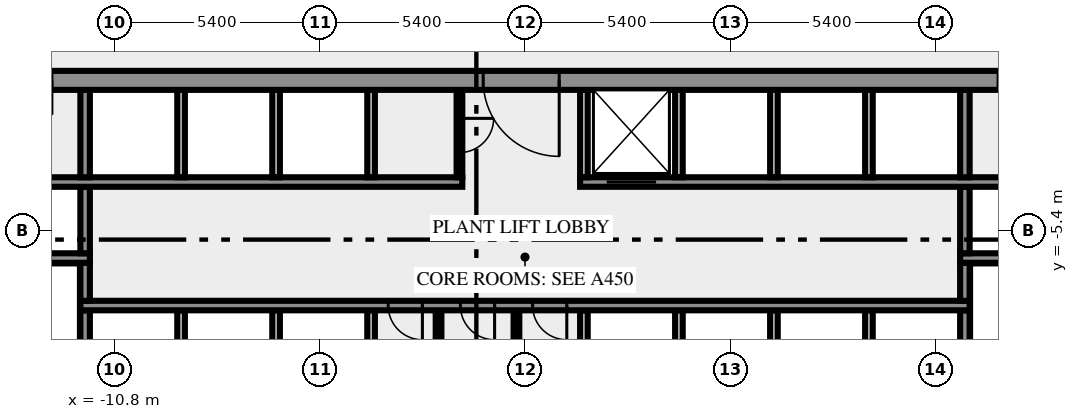
"""IFC4 building model, lengths in metres.
Left out: names, types, materials, properties, quantities, classifications, styles, units other than length and angle.
Written with IfcOpenShell. Run it as: python <this file> out.ifc"""

import sys

from ifc_helpers import new_model, si_unit, direction, frame, frame_2d, origin, place, context, subcontext, project, spatial, rectangle, extrude, element, fill, save


model = new_model("IFC4")
c1 = context("Model", 3, precision=1e-05, world=origin(), true_north=direction((0.0, 1.0)))
c2 = subcontext(c1, "Body", "Model", "MODEL_VIEW")
j1 = project(units=[si_unit("LENGTHUNIT", "METRE"), si_unit("PLANEANGLEUNIT", "RADIAN")], contexts=[c1])
p1 = place(None, origin())
s1 = spatial("IfcSite", under=j1, at=p1, CompositionType="ELEMENT")
p2 = place(p1, origin())
s2 = spatial("IfcBuilding", under=s1, at=p2, CompositionType="ELEMENT")
p3 = place(p2, frame((0.0, 0.0, 25.0)))
s3 = spatial("IfcBuildingStorey", under=s2, at=p3, CompositionType="ELEMENT", Elevation=25.0)
p4 = place(p3, frame((-11.575, -10.5, 0.0), z_axis=(0.0, 0.0, 1.0), x_axis=(0.0, 1.0, 0.0)))
e1 = element("IfcWall", 1, at=p4, inside=s3, PredefinedType="SHEAR", context=c2, shape_type="SweptSolid", body=[
    extrude(rectangle(XDim=3.0, YDim=0.25, at=frame_2d((1.5, 0.0))), origin(), (0.0, 0.0, 1.0), 5.65),
])
for number, where, z_axis, x_axis in (
    (2, (-9.05, -10.5, 0.0), (0.0, 0.0, 1.0), (0.0, 1.0, 0.0)),
    (3, (-6.55, -10.5, 0.0), (0.0, 0.0, 1.0), (0.0, 1.0, 0.0)),
    (4, (-4.05, -10.5, 0.0), (0.0, 0.0, 1.0), (0.0, 1.0, 0.0)),
):
    element("IfcWall", number, at=place(p3, frame(where, z_axis=z_axis, x_axis=x_axis)), inside=s3, PredefinedType="SOLIDWALL", context=c2, shape_type="SweptSolid", body=[
        extrude(rectangle(XDim=3.0, YDim=0.2, at=frame_2d((1.5, 0.0))), origin(), (0.0, 0.0, 1.0), 5.65),
    ])
for number, where, z_axis, x_axis in (
    (5, (-2.275, -10.5, 0.0), (0.0, 0.0, 1.0), (0.0, 1.0, 0.0)),
    (6, (-0.225, -10.5, 0.0), (0.0, 0.0, 1.0), (0.0, 1.0, 0.0)),
):
    element("IfcWall", number, at=place(p3, frame(where, z_axis=z_axis, x_axis=x_axis)), inside=s3, PredefinedType="PARTITIONING", context=c2, shape_type="SweptSolid", body=[
        extrude(rectangle(XDim=3.0, YDim=0.15, at=frame_2d((1.5, 0.0))), origin(), (0.0, 0.0, 1.0), 5.65),
    ])
for number, where, z_axis, x_axis in (
    (7, (1.55, -10.5, 0.0), (0.0, 0.0, 1.0), (0.0, 1.0, 0.0)),
    (8, (4.05, -10.5, 0.0), (0.0, 0.0, 1.0), (0.0, 1.0, 0.0)),
    (9, (6.55, -10.5, 0.0), (0.0, 0.0, 1.0), (0.0, 1.0, 0.0)),
    (10, (9.05, -10.5, 0.0), (0.0, 0.0, 1.0), (0.0, 1.0, 0.0)),
):
    element("IfcWall", number, at=place(p3, frame(where, z_axis=z_axis, x_axis=x_axis)), inside=s3, PredefinedType="SOLIDWALL", context=c2, shape_type="SweptSolid", body=[
        extrude(rectangle(XDim=3.0, YDim=0.2, at=frame_2d((1.5, 0.0))), origin(), (0.0, 0.0, 1.0), 5.65),
    ])
p5 = place(p3, frame((11.575, -10.5, 0.0), z_axis=(0.0, 0.0, 1.0), x_axis=(0.0, 1.0, 0.0)))
e11 = element("IfcWall", 11, at=p5, inside=s3, PredefinedType="SHEAR", context=c2, shape_type="SweptSolid", body=[
    extrude(rectangle(XDim=3.0, YDim=0.25, at=frame_2d((1.5, 0.0))), origin(), (0.0, 0.0, 1.0), 5.65),
])
p6 = place(p3, frame((11.7, -7.375, 0.0), z_axis=(0.0, 0.0, 1.0), x_axis=(-1.0, 0.0, 0.0)))
e12 = element("IfcWall", 12, at=p6, inside=s3, PredefinedType="SHEAR", context=c2, shape_type="SweptSolid", body=[
    extrude(rectangle(XDim=23.4, YDim=0.25, at=frame_2d((11.7, 0.0))), origin(), (0.0, 0.0, 1.0), 5.65),
])
p7 = place(p6, frame((14.4, 0.0, 0.0)))
e13 = element("IfcOpeningElement", 13, at=p7, cuts=e12, PredefinedType="OPENING", context=c2, shape_type="SweptSolid", body=[
    extrude(rectangle(XDim=0.9, YDim=2.1, at=frame_2d((0.45, 1.05))), frame((0.0, 0.135, 0.0), z_axis=(0.0, -1.0, 0.0), x_axis=(1.0, 0.0, 0.0)), (0.0, 0.0, 1.0), 0.27),
])
p8 = place(p6, frame((12.5, 0.0, 0.0)))
e14 = element("IfcOpeningElement", 14, at=p8, cuts=e12, PredefinedType="OPENING", context=c2, shape_type="SweptSolid", body=[
    extrude(rectangle(XDim=0.9, YDim=2.1, at=frame_2d((0.45, 1.05))), frame((0.0, 0.135, 0.0), z_axis=(0.0, -1.0, 0.0), x_axis=(1.0, 0.0, 0.0)), (0.0, 0.0, 1.0), 0.27),
])
p9 = place(p6, frame((10.6, 0.0, 0.0)))
e15 = element("IfcOpeningElement", 15, at=p9, cuts=e12, PredefinedType="OPENING", context=c2, shape_type="SweptSolid", body=[
    extrude(rectangle(XDim=0.9, YDim=2.1, at=frame_2d((0.45, 1.05))), frame((0.0, 0.135, 0.0), z_axis=(0.0, -1.0, 0.0), x_axis=(1.0, 0.0, 0.0)), (0.0, 0.0, 1.0), 0.27),
])
for number, where, z_axis, x_axis in (
    (16, (-11.575, -7.25, 0.0), (0.0, 0.0, 1.0), (0.0, 1.0, 0.0)),
    (17, (11.575, -7.25, 0.0), (0.0, 0.0, 1.0), (0.0, 1.0, 0.0)),
):
    element("IfcWall", number, at=place(p3, frame(where, z_axis=z_axis, x_axis=x_axis)), inside=s3, PredefinedType="SHEAR", context=c2, shape_type="SweptSolid", body=[
        extrude(rectangle(XDim=1.0, YDim=0.25, at=frame_2d((0.5, 0.0))), origin(), (0.0, 0.0, 1.0), 5.65),
    ])
p10 = place(p3, frame((-11.45, -6.125, 0.0), z_axis=(0.0, 0.0, 1.0), x_axis=(-1.0, 0.0, 0.0)))
e18 = element("IfcWall", 18, at=p10, inside=s3, PredefinedType="SHEAR", context=c2, shape_type="SweptSolid", body=[
    extrude(rectangle(XDim=8.05, YDim=0.25, at=frame_2d((4.025, 0.0))), origin(), (0.0, 0.0, 1.0), 5.65),
])
p11 = place(p10, frame((6.2, 0.0, 0.0)))
e19 = element("IfcOpeningElement", 19, at=p11, cuts=e18, PredefinedType="OPENING", context=c2, shape_type="SweptSolid", body=[
    extrude(rectangle(XDim=1.8, YDim=2.1, at=frame_2d((0.9, 1.05))), frame((0.0, 0.135, 0.0), z_axis=(0.0, -1.0, 0.0), x_axis=(1.0, 0.0, 0.0)), (0.0, 0.0, 1.0), 0.27),
])
p12 = place(p3, frame((19.5, -6.125, 0.0), z_axis=(0.0, 0.0, 1.0), x_axis=(-1.0, 0.0, 0.0)))
e20 = element("IfcWall", 20, at=p12, inside=s3, PredefinedType="SHEAR", context=c2, shape_type="SweptSolid", body=[
    extrude(rectangle(XDim=8.05, YDim=0.25, at=frame_2d((4.025, 0.0))), origin(), (0.0, 0.0, 1.0), 5.65),
])
p13 = place(p12, frame((0.05, 0.0, 0.0)))
e21 = element("IfcOpeningElement", 21, at=p13, cuts=e20, PredefinedType="OPENING", context=c2, shape_type="SweptSolid", body=[
    extrude(rectangle(XDim=1.8, YDim=2.1, at=frame_2d((0.9, 1.05))), frame((0.0, 0.135, 0.0), z_axis=(0.0, -1.0, 0.0), x_axis=(1.0, 0.0, 0.0)), (0.0, 0.0, 1.0), 0.27),
])
for number, where, z_axis, x_axis in (
    (22, (-11.575, -6.0, 0.0), (0.0, 0.0, 1.0), (0.0, 1.0, 0.0)),
    (23, (11.575, -6.0, 0.0), (0.0, 0.0, 1.0), (0.0, 1.0, 0.0)),
):
    element("IfcWall", number, at=place(p3, frame(where, z_axis=z_axis, x_axis=x_axis)), inside=s3, PredefinedType="SHEAR", context=c2, shape_type="SweptSolid", body=[
        extrude(rectangle(XDim=1.75, YDim=0.25, at=frame_2d((0.875, 0.0))), origin(), (0.0, 0.0, 1.0), 5.65),
    ])
p14 = place(p3, frame((-14.35, -4.125, 0.0), z_axis=(0.0, 0.0, 1.0), x_axis=(1.0, 0.0, 0.0)))
e24 = element("IfcWall", 24, at=p14, inside=s3, PredefinedType="SHEAR", context=c2, shape_type="SweptSolid", body=[
    extrude(rectangle(XDim=12.7, YDim=0.25, at=frame_2d((6.35, 0.0))), origin(), (0.0, 0.0, 1.0), 5.65),
])
p15 = place(p3, frame((1.45, -4.125, 0.0), z_axis=(0.0, 0.0, 1.0), x_axis=(1.0, 0.0, 0.0)))
e25 = element("IfcWall", 25, at=p15, inside=s3, PredefinedType="SHEAR", context=c2, shape_type="SweptSolid", body=[
    extrude(rectangle(XDim=12.9, YDim=0.25, at=frame_2d((6.45, 0.0))), origin(), (0.0, 0.0, 1.0), 5.65),
])
p16 = place(p15, frame((0.7, 0.0, 0.0)))
e26 = element("IfcOpeningElement", 26, at=p16, cuts=e25, PredefinedType="OPENING", context=c2, shape_type="SweptSolid", body=[
    extrude(rectangle(XDim=1.3, YDim=2.1, at=frame_2d((0.65, 1.05))), frame((0.0, 0.135, 0.0), z_axis=(0.0, -1.0, 0.0), x_axis=(1.0, 0.0, 0.0)), (0.0, 0.0, 1.0), 0.27),
])
p17 = place(p3, frame((-11.575, -4.0, 0.0), z_axis=(0.0, 0.0, 1.0), x_axis=(0.0, 1.0, 0.0)))
e27 = element("IfcWall", 27, at=p17, inside=s3, PredefinedType="SHEAR", context=c2, shape_type="SweptSolid", body=[
    extrude(rectangle(XDim=2.3, YDim=0.25, at=frame_2d((1.15, 0.0))), origin(), (0.0, 0.0, 1.0), 5.65),
])
for number, where, z_axis, x_axis in (
    (28, (-9.05, -4.0, 0.0), (0.0, 0.0, 1.0), (0.0, 1.0, 0.0)),
    (29, (-6.55, -4.0, 0.0), (0.0, 0.0, 1.0), (0.0, 1.0, 0.0)),
    (30, (-4.05, -4.0, 0.0), (0.0, 0.0, 1.0), (0.0, 1.0, 0.0)),
):
    element("IfcWall", number, at=place(p3, frame(where, z_axis=z_axis, x_axis=x_axis)), inside=s3, PredefinedType="SOLIDWALL", context=c2, shape_type="SweptSolid", body=[
        extrude(rectangle(XDim=2.3, YDim=0.2, at=frame_2d((1.15, 0.0))), origin(), (0.0, 0.0, 1.0), 5.65),
    ])
p18 = place(p3, frame((-1.725, -1.7, 0.0), z_axis=(0.0, 0.0, 1.0), x_axis=(0.0, -1.0, 0.0)))
e31 = element("IfcWall", 31, at=p18, inside=s3, PredefinedType="PARTITIONING", context=c2, shape_type="SweptSolid", body=[
    extrude(rectangle(XDim=2.3, YDim=0.15, at=frame_2d((1.15, 0.0))), origin(), (0.0, 0.0, 1.0), 5.65),
])
p19 = place(p18, frame((0.75, 0.0, 0.0)))
e32 = element("IfcOpeningElement", 32, at=p19, cuts=e31, PredefinedType="OPENING", context=c2, shape_type="SweptSolid", body=[
    extrude(rectangle(XDim=0.9, YDim=2.1, at=frame_2d((0.45, 1.05))), frame((0.0, 0.085, 0.0), z_axis=(0.0, -1.0, 0.0), x_axis=(1.0, 0.0, 0.0)), (0.0, 0.0, 1.0), 0.17),
])
for number, where, z_axis, x_axis in (
    (33, (1.55, -4.0, 0.0), (0.0, 0.0, 1.0), (0.0, 1.0, 0.0)),
    (34, (4.05, -4.0, 0.0), (0.0, 0.0, 1.0), (0.0, 1.0, 0.0)),
    (35, (6.55, -4.0, 0.0), (0.0, 0.0, 1.0), (0.0, 1.0, 0.0)),
    (36, (9.05, -4.0, 0.0), (0.0, 0.0, 1.0), (0.0, 1.0, 0.0)),
):
    element("IfcWall", number, at=place(p3, frame(where, z_axis=z_axis, x_axis=x_axis)), inside=s3, PredefinedType="SOLIDWALL", context=c2, shape_type="SweptSolid", body=[
        extrude(rectangle(XDim=2.3, YDim=0.2, at=frame_2d((1.15, 0.0))), origin(), (0.0, 0.0, 1.0), 5.65),
    ])
p20 = place(p3, frame((11.575, -4.0, 0.0), z_axis=(0.0, 0.0, 1.0), x_axis=(0.0, 1.0, 0.0)))
e37 = element("IfcWall", 37, at=p20, inside=s3, PredefinedType="SHEAR", context=c2, shape_type="SweptSolid", body=[
    extrude(rectangle(XDim=2.3, YDim=0.25, at=frame_2d((1.15, 0.0))), origin(), (0.0, 0.0, 1.0), 5.65),
])
p21 = place(p3, frame((20.49, -1.45, 0.0), z_axis=(0.0, 0.0, 1.0), x_axis=(-1.0, 0.0, 0.0)))
e38 = element("IfcWall", 38, at=p21, inside=s3, PredefinedType="SHEAR", context=c2, shape_type="SweptSolid", body=[
    extrude(rectangle(XDim=40.98, YDim=0.5, at=frame_2d((20.49, 0.0))), origin(), (0.0, 0.0, 1.0), 5.65),
])
p22 = place(p21, frame((38.14, 0.0, 0.0)))
e39 = element("IfcOpeningElement", 39, at=p22, cuts=e38, PredefinedType="OPENING", context=c2, shape_type="SweptSolid", body=[
    extrude(rectangle(XDim=1.8, YDim=2.1, at=frame_2d((0.9, 1.05))), frame((0.0, 0.26, 0.0), z_axis=(0.0, -1.0, 0.0), x_axis=(1.0, 0.0, 0.0)), (0.0, 0.0, 1.0), 0.52),
])
p23 = place(p21, frame((35.89, 0.0, 0.0)))
e40 = element("IfcOpeningElement", 40, at=p23, cuts=e38, PredefinedType="OPENING", context=c2, shape_type="SweptSolid", body=[
    extrude(rectangle(XDim=0.9, YDim=2.1, at=frame_2d((0.45, 1.05))), frame((0.0, 0.26, 0.0), z_axis=(0.0, -1.0, 0.0), x_axis=(1.0, 0.0, 0.0)), (0.0, 0.0, 1.0), 0.52),
])
p24 = place(p21, frame((32.94, 0.0, 0.0)))
e41 = element("IfcOpeningElement", 41, at=p24, cuts=e38, PredefinedType="OPENING", context=c2, shape_type="SweptSolid", body=[
    extrude(rectangle(XDim=0.9, YDim=2.1, at=frame_2d((0.45, 1.05))), frame((0.0, 0.26, 0.0), z_axis=(0.0, -1.0, 0.0), x_axis=(1.0, 0.0, 0.0)), (0.0, 0.0, 1.0), 0.52),
])
p25 = place(p21, frame((19.59, 0.0, 0.0)))
e42 = element("IfcOpeningElement", 42, at=p25, cuts=e38, PredefinedType="OPENING", context=c2, shape_type="SweptSolid", body=[
    extrude(rectangle(XDim=2.0, YDim=2.1, at=frame_2d((1.0, 1.05))), frame((0.0, 0.26, 0.0), z_axis=(0.0, -1.0, 0.0), x_axis=(1.0, 0.0, 0.0)), (0.0, 0.0, 1.0), 0.52),
])
p26 = place(p21, frame((7.14, 0.0, 0.0)))
e43 = element("IfcOpeningElement", 43, at=p26, cuts=e38, PredefinedType="OPENING", context=c2, shape_type="SweptSolid", body=[
    extrude(rectangle(XDim=0.9, YDim=2.1, at=frame_2d((0.45, 1.05))), frame((0.0, 0.26, 0.0), z_axis=(0.0, -1.0, 0.0), x_axis=(1.0, 0.0, 0.0)), (0.0, 0.0, 1.0), 0.52),
])
p27 = place(p21, frame((5.028, 0.0, 0.0)))
e44 = element("IfcOpeningElement", 44, at=p27, cuts=e38, PredefinedType="OPENING", context=c2, shape_type="SweptSolid", body=[
    extrude(rectangle(XDim=0.8, YDim=2.1, at=frame_2d((0.4, 1.05))), frame((0.0, 0.26, 0.0), z_axis=(0.0, -1.0, 0.0), x_axis=(1.0, 0.0, 0.0)), (0.0, 0.0, 1.0), 0.52),
])
p28 = place(p21, frame((3.452, 0.0, 0.0)))
e45 = element("IfcOpeningElement", 45, at=p28, cuts=e38, PredefinedType="OPENING", context=c2, shape_type="SweptSolid", body=[
    extrude(rectangle(XDim=0.8, YDim=2.1, at=frame_2d((0.4, 1.05))), frame((0.0, 0.26, 0.0), z_axis=(0.0, -1.0, 0.0), x_axis=(1.0, 0.0, 0.0)), (0.0, 0.0, 1.0), 0.52),
])
p29 = place(p21, frame((1.04, 0.0, 0.0)))
e46 = element("IfcOpeningElement", 46, at=p29, cuts=e38, PredefinedType="OPENING", context=c2, shape_type="SweptSolid", body=[
    extrude(rectangle(XDim=1.8, YDim=2.1, at=frame_2d((0.9, 1.05))), frame((0.0, 0.26, 0.0), z_axis=(0.0, -1.0, 0.0), x_axis=(1.0, 0.0, 0.0)), (0.0, 0.0, 1.0), 0.52),
])
p30 = place(p7, origin())
e47 = element("IfcDoor", 47, at=p30, inside=s3, OperationType="SINGLE_SWING_RIGHT", PredefinedType="DOOR", context=c2, shape_type="SweptSolid", body=[
    extrude(rectangle(XDim=0.9, YDim=2.1, at=frame_2d((0.45, 1.05))), frame((0.0, 0.025, 0.0), z_axis=(0.0, -1.0, 0.0), x_axis=(1.0, 0.0, 0.0)), (0.0, 0.0, 1.0), 0.05),
])
fill(e13, e47)
p31 = place(p8, origin())
e48 = element("IfcDoor", 48, at=p31, inside=s3, OperationType="SINGLE_SWING_RIGHT", PredefinedType="DOOR", context=c2, shape_type="SweptSolid", body=[
    extrude(rectangle(XDim=0.9, YDim=2.1, at=frame_2d((0.45, 1.05))), frame((0.0, 0.025, 0.0), z_axis=(0.0, -1.0, 0.0), x_axis=(1.0, 0.0, 0.0)), (0.0, 0.0, 1.0), 0.05),
])
fill(e14, e48)
p32 = place(p9, origin())
e49 = element("IfcDoor", 49, at=p32, inside=s3, OperationType="SINGLE_SWING_LEFT", PredefinedType="DOOR", context=c2, shape_type="SweptSolid", body=[
    extrude(rectangle(XDim=0.9, YDim=2.1, at=frame_2d((0.45, 1.05))), frame((0.0, 0.025, 0.0), z_axis=(0.0, -1.0, 0.0), x_axis=(1.0, 0.0, 0.0)), (0.0, 0.0, 1.0), 0.05),
])
fill(e15, e49)
p33 = place(p16, origin())
e50 = element("IfcDoor", 50, at=p33, inside=s3, OperationType="DOUBLE_DOOR_SLIDING", PredefinedType="DOOR", context=c2, shape_type="SweptSolid", body=[
    extrude(rectangle(XDim=1.3, YDim=2.1, at=frame_2d((0.65, 1.05))), frame((0.0, 0.025, 0.0), z_axis=(0.0, -1.0, 0.0), x_axis=(1.0, 0.0, 0.0)), (0.0, 0.0, 1.0), 0.05),
])
fill(e26, e50)
p34 = place(p19, origin())
e51 = element("IfcDoor", 51, at=p34, inside=s3, OperationType="SINGLE_SWING_RIGHT", PredefinedType="DOOR", context=c2, shape_type="SweptSolid", body=[
    extrude(rectangle(XDim=0.9, YDim=2.1, at=frame_2d((0.45, 1.05))), frame((0.0, 0.025, 0.0), z_axis=(0.0, -1.0, 0.0), x_axis=(1.0, 0.0, 0.0)), (0.0, 0.0, 1.0), 0.05),
])
fill(e32, e51)
p35 = place(p25, origin())
e52 = element("IfcDoor", 52, at=p35, inside=s3, OperationType="DOUBLE_DOOR_SINGLE_SWING", PredefinedType="DOOR", context=c2, shape_type="SweptSolid", body=[
    extrude(rectangle(XDim=2.0, YDim=2.1, at=frame_2d((1.0, 1.05))), frame((0.0, 0.025, 0.0), z_axis=(0.0, -1.0, 0.0), x_axis=(1.0, 0.0, 0.0)), (0.0, 0.0, 1.0), 0.05),
])
fill(e42, e52)
save(model, sys.argv[1])
